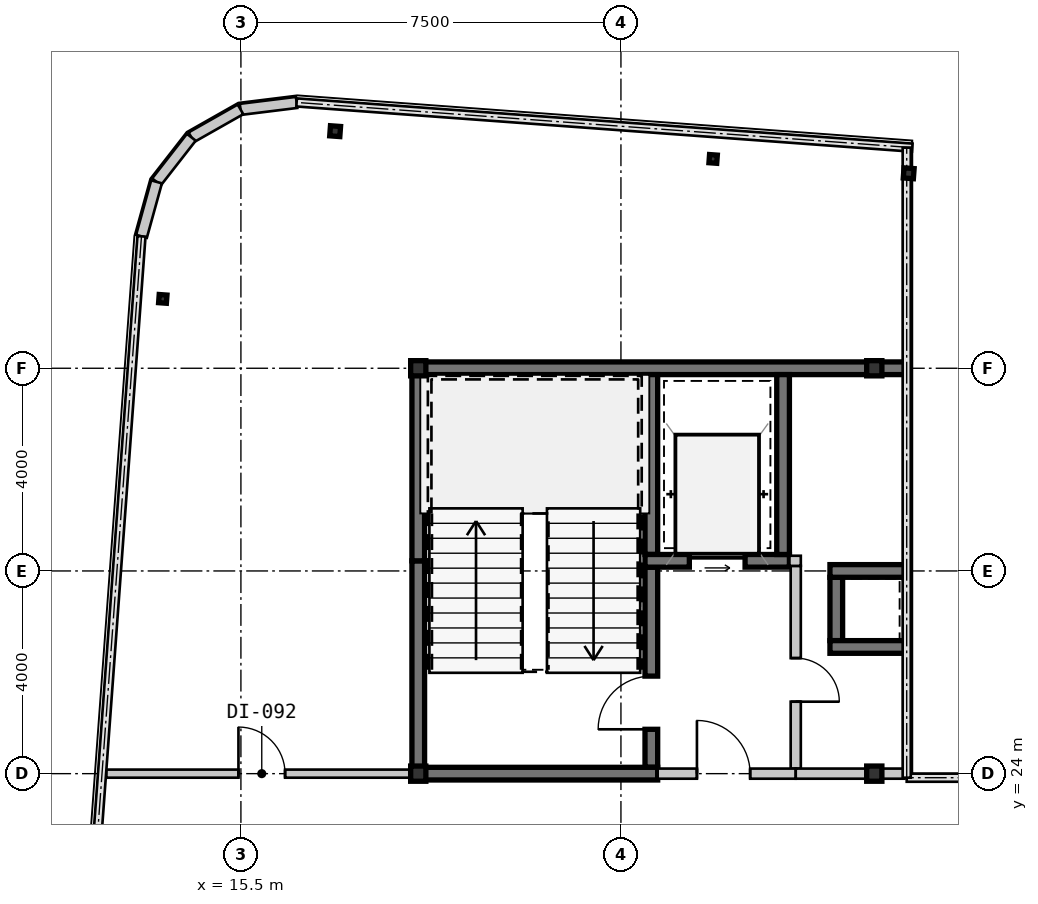
"""IFC4 building model, lengths in metres.
Left out: names, types, materials, properties, quantities, classifications, styles, units other than length and angle.
Written with IfcOpenShell. Run it as: python <this file> out.ifc"""

import sys

from ifc_helpers import new_model, si_unit, direction, frame, frame_2d, origin, origin_2d, place, context, subcontext, project, spatial, rectangle, hollow_rectangle, i_section, extrude, source, transform, mapped, element, fill, save


model = new_model("IFC4")
c1 = context("Model", 3, precision=1e-05, world=origin(), true_north=direction((0.0, 1.0)))
c2 = subcontext(c1, "Body", "Model", "MODEL_VIEW")
j1 = project(units=[si_unit("LENGTHUNIT", "METRE"), si_unit("PLANEANGLEUNIT", "RADIAN")], contexts=[c1])
p1 = place(None, origin())
s1 = spatial("IfcSite", under=j1, at=p1, CompositionType="ELEMENT")
p2 = place(p1, origin())
s2 = spatial("IfcBuilding", under=s1, at=p2, CompositionType="ELEMENT")
p3 = place(p2, frame((0.0, 0.0, 233.45)))
s3 = spatial("IfcBuildingStorey", under=s2, at=p3, CompositionType="ELEMENT", Elevation=233.45)
m1 = source(origin(), c2, "Body", "SweptSolid", [
    extrude(hollow_rectangle(XDim=0.3, YDim=0.3, WallThickness=0.012, at=origin_2d()), origin(), (0.0, 0.0, 1.0), 3.15),
])
for number, where, z_axis, x_axis in (
    (1, (19.0, 24.0, 0.0), (0.0, 0.0, 1.0), (1.0, 0.0, 0.0)),
    (2, (28.0, 24.0, 0.0), (0.0, 0.0, 1.0), (1.0, 0.0, 0.0)),
    (3, (19.0, 32.0, 0.0), (0.0, 0.0, 1.0), (1.0, 0.0, 0.0)),
    (4, (28.0, 32.0, 0.0), (0.0, 0.0, 1.0), (1.0, 0.0, 0.0)),
):
    element("IfcColumn", number, at=place(p3, frame(where, z_axis=z_axis, x_axis=x_axis)), inside=s3, PredefinedType="COLUMN", context=c2, shape_type="MappedRepresentation", body=[
        mapped(m1, transform((0.0, 0.0, 0.0), scale=1.0)),
    ])
m2 = source(origin(), c2, "Body", "SweptSolid", [
    extrude(hollow_rectangle(XDim=0.2, YDim=0.2, WallThickness=0.009, at=origin_2d()), origin(), (0.0, 0.0, 1.0), 3.15),
])
p4 = place(p3, frame((17.36, 36.679, 0.0), z_axis=(0.0, 0.0, 1.0), x_axis=(0.997314477224, -0.073238197128, 0.0)))
e5 = element("IfcColumn", 5, at=p4, inside=s3, PredefinedType="COLUMN", context=c2, shape_type="MappedRepresentation", body=[
    mapped(m2, transform((0.0, 0.0, 0.0), scale=1.0)),
])
m3 = source(origin(), c2, "Body", "SweptSolid", [
    extrude(i_section(OverallWidth=0.154, OverallDepth=0.162, WebThickness=0.008, FlangeThickness=0.011, at=origin_2d()), origin(), (0.0, 0.0, 1.0), 3.15),
])
for number, where, z_axis, x_axis in (
    (6, (24.82, 36.131, 0.0), (0.0, 0.0, 1.0), (0.997, -0.073, 0.0)),
    (7, (13.958, 33.369, 0.0), (0.0, 0.0, 1.0), (0.997, -0.073, 0.0)),
):
    element("IfcColumn", number, at=place(p3, frame(where, z_axis=z_axis, x_axis=x_axis)), inside=s3, PredefinedType="COLUMN", context=c2, shape_type="MappedRepresentation", body=[
        mapped(m3, transform((0.0, 0.0, 0.0), scale=1.0)),
    ])
p5 = place(p3, frame((28.679, 35.848, 0.0), z_axis=(0.0, 0.0, 1.0), x_axis=(0.997314477224, -0.073238197128, 0.0)))
e8 = element("IfcColumn", 8, at=p5, inside=s3, PredefinedType="COLUMN", context=c2, shape_type="MappedRepresentation", body=[
    mapped(m2, transform((0.0, 0.0, 0.0), scale=1.0)),
])
m4 = source(origin(), c2, "Body", "SweptSolid", [
    extrude(rectangle(XDim=1.116, YDim=0.22, at=frame_2d((0.558, 0.0))), origin(), (0.0, 0.0, 1.0), 2.87),
])
p6 = place(p3, frame((16.599, 37.246, 0.0), z_axis=(0.0, 0.0, 1.0), x_axis=(-0.992441899189, -0.122715429897, 0.0)))
e9 = element("IfcWall", 9, at=p6, inside=s3, PredefinedType="SOLIDWALL", context=c2, shape_type="MappedRepresentation", body=[
    mapped(m4, transform((0.0, 0.0, 0.0), scale=1.0)),
])
m5 = source(origin(), c2, "Body", "SweptSolid", [
    extrude(rectangle(XDim=1.116, YDim=0.22, at=frame_2d((0.558, 0.0))), origin(), (0.0, 0.0, 1.0), 2.87),
])
p7 = place(p3, frame((15.492, 37.109, 0.0), z_axis=(0.0, 0.0, 1.0), x_axis=(-0.869934579941, -0.493167138628, 0.0)))
e10 = element("IfcWall", 10, at=p7, inside=s3, PredefinedType="SOLIDWALL", context=c2, shape_type="MappedRepresentation", body=[
    mapped(m5, transform((0.0, 0.0, 0.0), scale=1.0)),
])
m6 = source(origin(), c2, "Body", "SweptSolid", [
    extrude(rectangle(XDim=1.116, YDim=0.22, at=frame_2d((0.558, 0.0))), origin(), (0.0, 0.0, 1.0), 2.87),
])
p8 = place(p3, frame((14.521, 36.559, 0.0), z_axis=(0.0, 0.0, 1.0), x_axis=(-0.614909386406, -0.788597772321, 0.0)))
e11 = element("IfcWall", 11, at=p8, inside=s3, PredefinedType="SOLIDWALL", context=c2, shape_type="MappedRepresentation", body=[
    mapped(m6, transform((0.0, 0.0, 0.0), scale=1.0)),
])
p9 = place(p3, frame((13.835, 35.679, 0.0), z_axis=(0.0, 0.0, 1.0), x_axis=(-0.266300605026, -0.963890028874, 0.0)))
e12 = element("IfcWall", 12, at=p9, inside=s3, PredefinedType="SOLIDWALL", context=c2, shape_type="MappedRepresentation", body=[
    mapped(m5, transform((0.0, 0.0, 0.0), scale=1.0)),
])
m7 = source(origin(), c2, "Body", "SweptSolid", [
    extrude(rectangle(XDim=9.125, YDim=0.25, at=frame_2d((4.562, 0.0))), origin(), (0.0, 0.0, 1.0), 2.87),
])
p10 = place(p3, frame((18.875, 32.0, 0.0), z_axis=(0.0, 0.0, 1.0), x_axis=(1.0, 0.0, 0.0)))
e13 = element("IfcWall", 13, at=p10, inside=s3, PredefinedType="SHEAR", context=c2, shape_type="MappedRepresentation", body=[
    mapped(m7, transform((0.0, 0.0, 0.0), scale=1.0)),
])
m8 = source(origin(), c2, "Body", "SweptSolid", [
    extrude(rectangle(XDim=0.64, YDim=0.25, at=frame_2d((0.32, 0.0))), origin(), (0.0, 0.0, 1.0), 2.87),
])
p11 = place(p3, frame((28.0, 32.0, 0.0), z_axis=(0.0, 0.0, 1.0), x_axis=(1.0, 0.0, 0.0)))
e14 = element("IfcWall", 14, at=p11, inside=s3, PredefinedType="SHEAR", context=c2, shape_type="MappedRepresentation", body=[
    mapped(m8, transform((0.0, 0.0, 0.0), scale=1.0)),
])
m9 = source(origin(), c2, "Body", "SweptSolid", [
    extrude(rectangle(XDim=4.075, YDim=0.25, at=frame_2d((2.038, 0.0))), origin(), (0.0, 0.0, 1.0), 2.87),
])
p12 = place(p3, frame((19.0, 24.125, 0.0), z_axis=(0.0, 0.0, 1.0), x_axis=(0.0, 1.0, 0.0)))
e15 = element("IfcWall", 15, at=p12, inside=s3, PredefinedType="SHEAR", context=c2, shape_type="MappedRepresentation", body=[
    mapped(m9, transform((0.0, 0.0, 0.0), scale=1.0)),
])
m10 = source(origin(), c2, "Body", "SweptSolid", [
    extrude(rectangle(XDim=3.675, YDim=0.25, at=frame_2d((1.837, 0.0))), origin(), (0.0, 0.0, 1.0), 2.87),
])
p13 = place(p3, frame((19.0, 28.2, 0.0), z_axis=(0.0, 0.0, 1.0), x_axis=(0.0, 1.0, 0.0)))
e16 = element("IfcWall", 16, at=p13, inside=s3, PredefinedType="SHEAR", context=c2, shape_type="MappedRepresentation", body=[
    mapped(m10, transform((0.0, 0.0, 0.0), scale=1.0)),
])
m11 = source(origin(), c2, "Body", "SweptSolid", [
    extrude(rectangle(XDim=3.55, YDim=0.25, at=frame_2d((1.775, 0.0))), origin(), (0.0, 0.0, 1.0), 2.87),
])
p14 = place(p3, frame((23.6, 28.325, 0.0), z_axis=(0.0, 0.0, 1.0), x_axis=(0.0, 1.0, 0.0)))
e17 = element("IfcWall", 17, at=p14, inside=s3, PredefinedType="SHEAR", context=c2, shape_type="MappedRepresentation", body=[
    mapped(m11, transform((0.0, 0.0, 0.0), scale=1.0)),
])
m12 = source(origin(), c2, "Body", "SweptSolid", [
    extrude(rectangle(XDim=3.95, YDim=0.25, at=frame_2d((1.975, 0.0))), origin(), (0.0, 0.0, 1.0), 2.87),
])
p15 = place(p3, frame((23.6, 24.125, 0.0), z_axis=(0.0, 0.0, 1.0), x_axis=(0.0, 1.0, 0.0)))
e18 = element("IfcWall", 18, at=p15, inside=s3, PredefinedType="SHEAR", context=c2, shape_type="MappedRepresentation", body=[
    mapped(m12, transform((0.0, 0.0, 0.0), scale=1.0)),
])
m13 = source(origin(), c2, "Body", "SweptSolid", [
    extrude(rectangle(XDim=1.05, YDim=2.1, at=frame_2d((0.525, 1.05))), frame((0.0, 0.135, 0.0), z_axis=(0.0, -1.0, 0.0), x_axis=(1.0, 0.0, 0.0)), (0.0, 0.0, 1.0), 0.27),
])
p16 = place(p15, frame((0.75, 0.0, 0.0)))
e19 = element("IfcOpeningElement", 19, at=p16, cuts=e18, PredefinedType="OPENING", context=c2, shape_type="MappedRepresentation", body=[
    mapped(m13, transform((0.0, 0.0, 0.0), scale=1.0)),
])
m14 = source(origin(), c2, "Body", "SweptSolid", [
    extrude(rectangle(XDim=4.85, YDim=0.25, at=frame_2d((2.425, 0.0))), origin(), (0.0, 0.0, 1.0), 2.87),
])
p17 = place(p3, frame((18.875, 24.0, 0.0), z_axis=(0.0, 0.0, 1.0), x_axis=(1.0, 0.0, 0.0)))
e20 = element("IfcWall", 20, at=p17, inside=s3, PredefinedType="SHEAR", context=c2, shape_type="MappedRepresentation", body=[
    mapped(m14, transform((0.0, 0.0, 0.0), scale=1.0)),
])
m15 = source(origin(), c2, "Body", "SweptSolid", [
    extrude(rectangle(XDim=2.85, YDim=0.25, at=frame_2d((1.425, 0.0))), origin(), (0.0, 0.0, 1.0), 2.87),
])
p18 = place(p3, frame((23.475, 28.2, 0.0), z_axis=(0.0, 0.0, 1.0), x_axis=(1.0, 0.0, 0.0)))
e21 = element("IfcWall", 21, at=p18, inside=s3, PredefinedType="SHEAR", context=c2, shape_type="MappedRepresentation", body=[
    mapped(m15, transform((0.0, 0.0, 0.0), scale=1.0)),
])
m16 = source(origin(), c2, "Body", "SweptSolid", [
    extrude(rectangle(XDim=1.1, YDim=2.15, at=frame_2d((0.55, 1.075))), frame((0.0, 0.135, 0.0), z_axis=(0.0, -1.0, 0.0), x_axis=(1.0, 0.0, 0.0)), (0.0, 0.0, 1.0), 0.27),
])
p19 = place(p18, frame((0.875, 0.0, 0.0)))
e22 = element("IfcOpeningElement", 22, at=p19, cuts=e21, PredefinedType="OPENING", context=c2, shape_type="MappedRepresentation", body=[
    mapped(m16, transform((0.0, 0.0, 0.0), scale=1.0)),
])
p20 = place(p3, frame((26.2, 28.325, 0.0), z_axis=(0.0, 0.0, 1.0), x_axis=(0.0, 1.0, 0.0)))
e23 = element("IfcWall", 23, at=p20, inside=s3, PredefinedType="SHEAR", context=c2, shape_type="MappedRepresentation", body=[
    mapped(m11, transform((0.0, 0.0, 0.0), scale=1.0)),
])
m17 = source(origin(), c2, "Body", "SweptSolid", [
    extrude(rectangle(XDim=4.0, YDim=0.2, at=frame_2d((2.0, 0.0))), origin(), (0.0, 0.0, 1.0), 2.87),
])
p21 = place(p3, frame((26.45, 24.1, 0.0), z_axis=(0.0, 0.0, 1.0), x_axis=(0.0, 1.0, 0.0)))
e24 = element("IfcWall", 24, at=p21, inside=s3, PredefinedType="SOLIDWALL", context=c2, shape_type="MappedRepresentation", body=[
    mapped(m17, transform((0.0, 0.0, 0.0), scale=1.0)),
])
m18 = source(origin(), c2, "Body", "SweptSolid", [
    extrude(rectangle(XDim=0.86, YDim=2.1, at=frame_2d((0.43, 1.05))), frame((0.0, 0.11, 0.0), z_axis=(0.0, -1.0, 0.0), x_axis=(1.0, 0.0, 0.0)), (0.0, 0.0, 1.0), 0.22),
])
p22 = place(p21, frame((1.32, 0.0, 0.0)))
e25 = element("IfcOpeningElement", 25, at=p22, cuts=e24, PredefinedType="OPENING", context=c2, shape_type="MappedRepresentation", body=[
    mapped(m18, transform((0.0, 0.0, 0.0), scale=1.0)),
])
m19 = source(origin(), c2, "Body", "SweptSolid", [
    extrude(rectangle(XDim=2.725, YDim=0.2, at=frame_2d((1.362, 0.0))), origin(), (0.0, 0.0, 1.0), 2.41),
])
p23 = place(p3, frame((23.725, 24.0, 0.0), z_axis=(0.0, 0.0, 1.0), x_axis=(1.0, 0.0, 0.0)))
e26 = element("IfcWall", 26, at=p23, inside=s3, PredefinedType="SOLIDWALL", context=c2, shape_type="MappedRepresentation", body=[
    mapped(m19, transform((0.0, 0.0, 0.0), scale=1.0)),
])
m20 = source(origin(), c2, "Body", "SweptSolid", [
    extrude(rectangle(XDim=1.05, YDim=2.1, at=frame_2d((0.525, 1.05))), frame((0.0, 0.11, 0.0), z_axis=(0.0, -1.0, 0.0), x_axis=(1.0, 0.0, 0.0)), (0.0, 0.0, 1.0), 0.22),
])
p24 = place(p23, frame((0.775, 0.0, 0.0)))
e27 = element("IfcOpeningElement", 27, at=p24, cuts=e26, PredefinedType="OPENING", context=c2, shape_type="MappedRepresentation", body=[
    mapped(m20, transform((0.0, 0.0, 0.0), scale=1.0)),
])
m21 = source(origin(), c2, "Body", "SweptSolid", [
    extrude(rectangle(XDim=1.25, YDim=0.25, at=frame_2d((0.625, 0.0))), origin(), (0.0, 0.0, 1.0), 2.87),
])
p25 = place(p3, frame((27.25, 27.875, 0.0), z_axis=(0.0, 0.0, 1.0), x_axis=(0.0, -1.0, 0.0)))
e28 = element("IfcWall", 28, at=p25, inside=s3, PredefinedType="SHEAR", context=c2, shape_type="MappedRepresentation", body=[
    mapped(m21, transform((0.0, 0.0, 0.0), scale=1.0)),
])
m22 = source(origin(), c2, "Body", "SweptSolid", [
    extrude(rectangle(XDim=1.525, YDim=0.25, at=frame_2d((0.762, 0.0))), origin(), (0.0, 0.0, 1.0), 2.87),
])
for number, where, z_axis, x_axis in (
    (29, (28.65, 28.0, 0.0), (0.0, 0.0, 1.0), (-1.0, 0.0, 0.0)),
    (30, (27.125, 26.5, 0.0), (0.0, 0.0, 1.0), (1.0, 0.0, 0.0)),
):
    element("IfcWall", number, at=place(p3, frame(where, z_axis=z_axis, x_axis=x_axis)), inside=s3, PredefinedType="SHEAR", context=c2, shape_type="MappedRepresentation", body=[
        mapped(m22, transform((0.0, 0.0, 0.0), scale=1.0)),
    ])
m23 = source(origin(), c2, "Body", "SweptSolid", [
    extrude(rectangle(XDim=0.594, YDim=0.2, at=frame_2d((0.297, 0.0))), origin(), (0.0, 0.0, 1.0), 2.17),
])
p26 = place(p3, frame((28.594, 24.0, 0.0), z_axis=(0.0, 0.0, 1.0), x_axis=(-1.0, 0.0, 0.0)))
e31 = element("IfcWall", 31, at=p26, inside=s3, PredefinedType="SOLIDWALL", context=c2, shape_type="MappedRepresentation", body=[
    mapped(m23, transform((0.0, 0.0, 0.0), scale=1.0)),
])
m24 = source(origin(), c2, "Body", "SweptSolid", [
    extrude(rectangle(XDim=1.55, YDim=0.2, at=frame_2d((0.775, 0.0))), origin(), (0.0, 0.0, 1.0), 2.41),
])
p27 = place(p3, frame((28.0, 24.0, 0.0), z_axis=(0.0, 0.0, 1.0), x_axis=(-1.0, 0.0, 0.0)))
e32 = element("IfcWall", 32, at=p27, inside=s3, PredefinedType="SOLIDWALL", context=c2, shape_type="MappedRepresentation", body=[
    mapped(m24, transform((0.0, 0.0, 0.0), scale=1.0)),
])
m25 = source(origin(), c2, "Body", "SweptSolid", [
    extrude(rectangle(XDim=6.032, YDim=0.16, at=frame_2d((3.016, 0.0))), origin(), (0.0, 0.0, 1.0), 2.87),
])
p28 = place(p3, frame((12.843, 24.0, 0.0), z_axis=(0.0, 0.0, 1.0), x_axis=(1.0, 0.0, 0.0)))
e33 = element("IfcWall", 33, at=p28, inside=s3, PredefinedType="PARTITIONING", context=c2, shape_type="MappedRepresentation", body=[
    mapped(m25, transform((0.0, 0.0, 0.0), scale=1.0)),
])
m26 = source(origin(), c2, "Body", "SweptSolid", [
    extrude(rectangle(XDim=0.92, YDim=2.1, at=frame_2d((0.46, 1.05))), frame((0.0, 0.09, 0.0), z_axis=(0.0, -1.0, 0.0), x_axis=(1.0, 0.0, 0.0)), (0.0, 0.0, 1.0), 0.18),
])
p29 = place(p28, frame((2.608, 0.0, 0.0)))
e34 = element("IfcOpeningElement", 34, at=p29, cuts=e33, PredefinedType="OPENING", context=c2, shape_type="MappedRepresentation", body=[
    mapped(m26, transform((0.0, 0.0, 0.0), scale=1.0)),
])
m27 = source(origin(), c2, "Body", "SweptSolid", [
    extrude(rectangle(XDim=0.225, YDim=0.2, at=frame_2d((0.113, 0.0))), origin(), (0.0, 0.0, 1.0), 2.87),
])
p30 = place(p3, frame((26.325, 28.2, 0.0), z_axis=(0.0, 0.0, 1.0), x_axis=(1.0, 0.0, 0.0)))
e35 = element("IfcWall", 35, at=p30, inside=s3, PredefinedType="SOLIDWALL", context=c2, shape_type="MappedRepresentation", body=[
    mapped(m27, transform((0.0, 0.0, 0.0), scale=1.0)),
])
m28 = source(origin(), c2, "Body", "SweptSolid", [
    extrude(rectangle(XDim=1.05, YDim=2.1, at=frame_2d((0.525, 1.05))), frame((0.0, 0.025, 0.0), z_axis=(0.0, -1.0, 0.0), x_axis=(1.0, 0.0, 0.0)), (0.0, 0.0, 1.0), 0.05),
])
p31 = place(p16, origin())
e36 = element("IfcDoor", 36, at=p31, inside=s3, OperationType="SINGLE_SWING_LEFT", PredefinedType="DOOR", context=c2, shape_type="MappedRepresentation", body=[
    mapped(m28, transform((0.0, 0.0, 0.0), scale=1.0)),
])
fill(e19, e36)
m29 = source(origin(), c2, "Body", "SweptSolid", [
    extrude(rectangle(XDim=1.1, YDim=2.15, at=frame_2d((0.55, 1.075))), frame((0.0, 0.025, 0.0), z_axis=(0.0, -1.0, 0.0), x_axis=(1.0, 0.0, 0.0)), (0.0, 0.0, 1.0), 0.05),
])
p32 = place(p19, origin())
e37 = element("IfcDoor", 37, at=p32, inside=s3, OperationType="SLIDING_TO_LEFT", PredefinedType="DOOR", context=c2, shape_type="MappedRepresentation", body=[
    mapped(m29, transform((0.0, 0.0, 0.0), scale=1.0)),
])
fill(e22, e37)
p33 = place(p24, origin())
e38 = element("IfcDoor", 38, at=p33, inside=s3, OperationType="SINGLE_SWING_LEFT", PredefinedType="DOOR", context=c2, shape_type="MappedRepresentation", body=[
    mapped(m28, transform((0.0, 0.0, 0.0), scale=1.0)),
])
fill(e27, e38)
m30 = source(origin(), c2, "Body", "SweptSolid", [
    extrude(rectangle(XDim=0.92, YDim=2.1, at=frame_2d((0.46, 1.05))), frame((0.0, 0.025, 0.0), z_axis=(0.0, -1.0, 0.0), x_axis=(1.0, 0.0, 0.0)), (0.0, 0.0, 1.0), 0.05),
])
p34 = place(p29, origin())
e39 = element("IfcDoor", 39, at=p34, inside=s3, OperationType="SINGLE_SWING_LEFT", PredefinedType="DOOR", context=c2, shape_type="MappedRepresentation", body=[
    mapped(m30, transform((0.0, 0.0, 0.0), scale=1.0)),
])
fill(e34, e39)
m31 = source(origin(), c2, "Body", "SweptSolid", [
    extrude(rectangle(XDim=0.86, YDim=2.1, at=frame_2d((0.43, 1.05))), frame((0.0, 0.025, 0.0), z_axis=(0.0, -1.0, 0.0), x_axis=(1.0, 0.0, 0.0)), (0.0, 0.0, 1.0), 0.05),
])
p35 = place(p22, frame((0.86, 0.0, 0.0), z_axis=(0.0, 0.0, 1.0), x_axis=(-1.0, 0.0, 0.0)))
e40 = element("IfcDoor", 40, at=p35, inside=s3, OperationType="SINGLE_SWING_RIGHT", PredefinedType="DOOR", context=c2, shape_type="MappedRepresentation", body=[
    mapped(m31, transform((0.0, 0.0, 0.0), scale=1.0)),
])
fill(e25, e40)
save(model, sys.argv[1])
